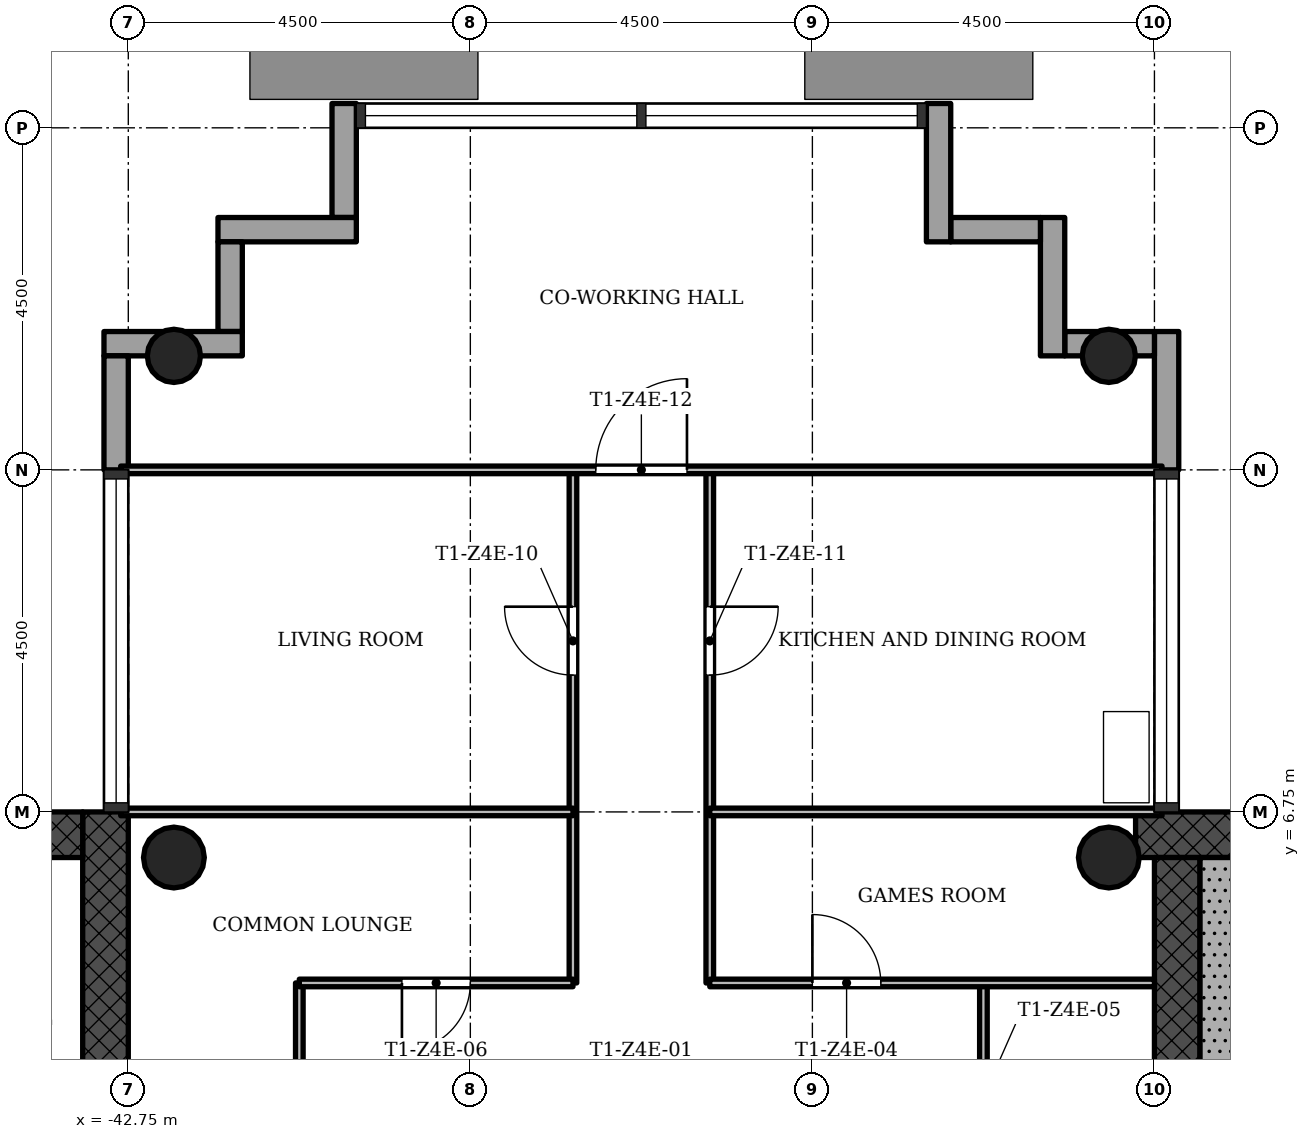
"""IFC4 building model, lengths in metres.
Left out: names, types, materials, properties, quantities, classifications, styles, units other than length and angle.
Written with IfcOpenShell. Run it as: python <this file> out.ifc"""

import sys

from ifc_helpers import new_model, si_unit, direction, frame, frame_2d, origin, origin_2d, place, context, subcontext, project, spatial, rectangle, hollow_circle, extrude, element, fill, save


model = new_model("IFC4")
c1 = context("Model", 3, precision=1e-05, world=origin(), true_north=direction((0.0, 1.0)))
c2 = subcontext(c1, "Body", "Model", "MODEL_VIEW")
j1 = project(units=[si_unit("LENGTHUNIT", "METRE"), si_unit("PLANEANGLEUNIT", "RADIAN")], contexts=[c1])
p1 = place(None, origin())
s1 = spatial("IfcSite", under=j1, at=p1, CompositionType="ELEMENT")
p2 = place(p1, origin())
s2 = spatial("IfcBuilding", under=s1, at=p2, CompositionType="ELEMENT")
p3 = place(p2, frame((0.0, 0.0, 209.6)))
s3 = spatial("IfcBuildingStorey", under=s2, at=p3, CompositionType="ELEMENT", Elevation=209.6)
p4 = place(p3, frame((-20.602, 6.45, 0.0), z_axis=(0.0, 0.0, 1.0), x_axis=(-1.0, 0.0, 0.0)))
e1 = element("IfcWall", 1, at=p4, inside=s3, PredefinedType="SHEAR", context=c2, shape_type="SweptSolid", body=[
    extrude(rectangle(XDim=8.896, YDim=0.6, at=frame_2d((4.448, 0.0))), origin(), (0.0, 0.0, 1.0), 3.4),
])
p5 = place(p3, frame((-28.95, 6.15, 0.0), z_axis=(0.0, 0.0, 1.0), x_axis=(0.0, -1.0, 0.0)))
e2 = element("IfcWall", 2, at=p5, inside=s3, PredefinedType="SHEAR", context=c2, shape_type="SweptSolid", body=[
    extrude(rectangle(XDim=12.9, YDim=0.6, at=frame_2d((6.45, 0.0))), origin(), (0.0, 0.0, 1.0), 3.4),
])
p6 = place(p5, frame((5.25, 0.0, 0.0)))
e3 = element("IfcOpeningElement", 3, at=p6, cuts=e2, PredefinedType="OPENING", context=c2, shape_type="SweptSolid", body=[
    extrude(rectangle(XDim=1.8, YDim=2.1, at=frame_2d((0.9, 1.05))), frame((0.0, 0.31, 0.0), z_axis=(0.0, -1.0, 0.0), x_axis=(1.0, 0.0, 0.0)), (0.0, 0.0, 1.0), 0.62),
])
p7 = place(p3, frame((-43.05, -6.15, 0.0), z_axis=(0.0, 0.0, 1.0), x_axis=(0.0, 1.0, 0.0)))
e4 = element("IfcWall", 4, at=p7, inside=s3, PredefinedType="SHEAR", context=c2, shape_type="SweptSolid", body=[
    extrude(rectangle(XDim=12.9, YDim=0.6, at=frame_2d((6.45, 0.0))), origin(), (0.0, 0.0, 1.0), 3.4),
])
p8 = place(p7, frame((5.25, 0.0, 0.0)))
e5 = element("IfcOpeningElement", 5, at=p8, cuts=e4, PredefinedType="OPENING", context=c2, shape_type="SweptSolid", body=[
    extrude(rectangle(XDim=1.8, YDim=2.1, at=frame_2d((0.9, 1.05))), frame((0.0, 0.31, 0.0), z_axis=(0.0, -1.0, 0.0), x_axis=(1.0, 0.0, 0.0)), (0.0, 0.0, 1.0), 0.62),
])
p9 = place(p3, frame((-43.35, 6.45, 0.0), z_axis=(0.0, 0.0, 1.0), x_axis=(-1.0, 0.0, 0.0)))
e6 = element("IfcWall", 6, at=p9, inside=s3, PredefinedType="SHEAR", context=c2, shape_type="SweptSolid", body=[
    extrude(rectangle(XDim=8.4, YDim=0.6, at=frame_2d((4.2, 0.0))), origin(), (0.0, 0.0, 1.0), 3.4),
])
for number, where, z_axis, x_axis in (
    (7, (-29.85, 12.75, 0.0), (0.0, 0.0, 1.0), (1.0, 0.0, 0.0)),
    (8, (-42.15, 12.75, 0.0), (0.0, 0.0, 1.0), (1.0, 0.0, 0.0)),
):
    element("IfcColumn", number, at=place(p3, frame(where, z_axis=z_axis, x_axis=x_axis)), inside=s3, PredefinedType="COLUMN", context=c2, shape_type="SweptSolid", body=[
        extrude(hollow_circle(Radius=0.35, WallThickness=0.025, at=origin_2d()), origin(), (0.0, 0.0, 1.0), 3.4),
    ])
for number, where, z_axis, x_axis in (
    (9, (-29.85, 6.15, 0.0), (0.0, 0.0, 1.0), (1.0, 0.0, 0.0)),
    (10, (-42.15, 6.15, 0.0), (0.0, 0.0, 1.0), (1.0, 0.0, 0.0)),
):
    element("IfcColumn", number, at=place(p3, frame(where, z_axis=z_axis, x_axis=x_axis)), inside=s3, PredefinedType="COLUMN", context=c2, shape_type="SweptSolid", body=[
        extrude(hollow_circle(Radius=0.4, WallThickness=0.028, at=origin_2d()), origin(), (0.0, 0.0, 1.0), 3.4),
    ])
p10 = place(p3, frame((-29.09, 11.25, -0.3), z_axis=(0.0, 0.0, 1.0), x_axis=(0.0, 1.0, 0.0)))
e11 = element("IfcWall", 11, at=p10, inside=s3, PredefinedType="STANDARD", context=c2, shape_type="SweptSolid", body=[
    extrude(rectangle(XDim=1.82, YDim=0.32, at=frame_2d((0.91, 0.0))), origin(), (0.0, 0.0, 1.0), 3.4),
])
p11 = place(p3, frame((-29.25, 12.91, -0.3), z_axis=(0.0, 0.0, 1.0), x_axis=(-1.0, 0.0, 0.0)))
e12 = element("IfcWall", 12, at=p11, inside=s3, PredefinedType="STANDARD", context=c2, shape_type="SweptSolid", body=[
    extrude(rectangle(XDim=1.18, YDim=0.32, at=frame_2d((0.59, 0.0))), origin(), (0.0, 0.0, 1.0), 3.4),
])
p12 = place(p3, frame((-30.59, 12.75, -0.3), z_axis=(0.0, 0.0, 1.0), x_axis=(0.0, 1.0, 0.0)))
e13 = element("IfcWall", 13, at=p12, inside=s3, PredefinedType="STANDARD", context=c2, shape_type="SweptSolid", body=[
    extrude(rectangle(XDim=1.82, YDim=0.32, at=frame_2d((0.91, 0.0))), origin(), (0.0, 0.0, 1.0), 3.4),
])
p13 = place(p3, frame((-30.75, 14.41, -0.3), z_axis=(0.0, 0.0, 1.0), x_axis=(-1.0, 0.0, 0.0)))
e14 = element("IfcWall", 14, at=p13, inside=s3, PredefinedType="STANDARD", context=c2, shape_type="SweptSolid", body=[
    extrude(rectangle(XDim=1.18, YDim=0.32, at=frame_2d((0.59, 0.0))), origin(), (0.0, 0.0, 1.0), 3.4),
])
p14 = place(p3, frame((-32.09, 14.25, -0.3), z_axis=(0.0, 0.0, 1.0), x_axis=(0.0, 1.0, 0.0)))
e15 = element("IfcWall", 15, at=p14, inside=s3, PredefinedType="STANDARD", context=c2, shape_type="SweptSolid", body=[
    extrude(rectangle(XDim=1.82, YDim=0.32, at=frame_2d((0.91, 0.0))), origin(), (0.0, 0.0, 1.0), 3.4),
])
p15 = place(p3, frame((-39.91, 16.07, -0.3), z_axis=(0.0, 0.0, 1.0), x_axis=(0.0, -1.0, 0.0)))
e16 = element("IfcWall", 16, at=p15, inside=s3, PredefinedType="STANDARD", context=c2, shape_type="SweptSolid", body=[
    extrude(rectangle(XDim=1.5, YDim=0.32, at=frame_2d((0.75, 0.0))), origin(), (0.0, 0.0, 1.0), 3.4),
])
p16 = place(p3, frame((-39.75, 14.41, -0.3), z_axis=(0.0, 0.0, 1.0), x_axis=(-1.0, 0.0, 0.0)))
e17 = element("IfcWall", 17, at=p16, inside=s3, PredefinedType="STANDARD", context=c2, shape_type="SweptSolid", body=[
    extrude(rectangle(XDim=1.82, YDim=0.32, at=frame_2d((0.91, 0.0))), origin(), (0.0, 0.0, 1.0), 3.4),
])
p17 = place(p3, frame((-41.41, 14.25, -0.3), z_axis=(0.0, 0.0, 1.0), x_axis=(0.0, -1.0, 0.0)))
e18 = element("IfcWall", 18, at=p17, inside=s3, PredefinedType="STANDARD", context=c2, shape_type="SweptSolid", body=[
    extrude(rectangle(XDim=1.18, YDim=0.32, at=frame_2d((0.59, 0.0))), origin(), (0.0, 0.0, 1.0), 3.4),
])
p18 = place(p3, frame((-41.25, 12.91, -0.3), z_axis=(0.0, 0.0, 1.0), x_axis=(-1.0, 0.0, 0.0)))
e19 = element("IfcWall", 19, at=p18, inside=s3, PredefinedType="STANDARD", context=c2, shape_type="SweptSolid", body=[
    extrude(rectangle(XDim=1.82, YDim=0.32, at=frame_2d((0.91, 0.0))), origin(), (0.0, 0.0, 1.0), 3.4),
])
p19 = place(p3, frame((-42.91, 12.75, -0.3), z_axis=(0.0, 0.0, 1.0), x_axis=(0.0, -1.0, 0.0)))
e20 = element("IfcWall", 20, at=p19, inside=s3, PredefinedType="STANDARD", context=c2, shape_type="SweptSolid", body=[
    extrude(rectangle(XDim=1.5, YDim=0.32, at=frame_2d((0.75, 0.0))), origin(), (0.0, 0.0, 1.0), 3.4),
])
p20 = place(p3, frame((-40.5, 1.5, 0.0), z_axis=(0.0, 0.0, 1.0), x_axis=(0.0, 1.0, 0.0)))
e21 = element("IfcWall", 21, at=p20, inside=s3, PredefinedType="PARTITIONING", context=c2, shape_type="SweptSolid", body=[
    extrude(rectangle(XDim=3.0, YDim=0.1, at=frame_2d((1.5, 0.0))), origin(), (0.0, 0.0, 1.0), 3.0),
])
p21 = place(p3, frame((-36.9, 4.5, 0.0), z_axis=(0.0, 0.0, 1.0), x_axis=(0.0, 1.0, 0.0)))
e22 = element("IfcWall", 22, at=p21, inside=s3, PredefinedType="PARTITIONING", context=c2, shape_type="SweptSolid", body=[
    extrude(rectangle(XDim=6.75, YDim=0.1, at=frame_2d((3.375, 0.0))), origin(), (0.0, 0.0, 1.0), 3.0),
])
p22 = place(p21, frame((4.05, 0.0, 0.0)))
e23 = element("IfcOpeningElement", 23, at=p22, cuts=e22, PredefinedType="OPENING", context=c2, shape_type="SweptSolid", body=[
    extrude(rectangle(XDim=0.9, YDim=2.1, at=frame_2d((0.45, 1.05))), frame((0.0, 0.06, 0.0), z_axis=(0.0, -1.0, 0.0), x_axis=(1.0, 0.0, 0.0)), (0.0, 0.0, 1.0), 0.12),
])
p23 = place(p3, frame((-35.1, 4.5, 0.0), z_axis=(0.0, 0.0, 1.0), x_axis=(0.0, 1.0, 0.0)))
e24 = element("IfcWall", 24, at=p23, inside=s3, PredefinedType="PARTITIONING", context=c2, shape_type="SweptSolid", body=[
    extrude(rectangle(XDim=6.75, YDim=0.1, at=frame_2d((3.375, 0.0))), origin(), (0.0, 0.0, 1.0), 3.0),
])
p24 = place(p23, frame((4.05, 0.0, 0.0)))
e25 = element("IfcOpeningElement", 25, at=p24, cuts=e24, PredefinedType="OPENING", context=c2, shape_type="SweptSolid", body=[
    extrude(rectangle(XDim=0.9, YDim=2.1, at=frame_2d((0.45, 1.05))), frame((0.0, 0.06, 0.0), z_axis=(0.0, -1.0, 0.0), x_axis=(1.0, 0.0, 0.0)), (0.0, 0.0, 1.0), 0.12),
])
p25 = place(p3, frame((-31.5, 1.5, 0.0), z_axis=(0.0, 0.0, 1.0), x_axis=(0.0, 1.0, 0.0)))
e26 = element("IfcWall", 26, at=p25, inside=s3, PredefinedType="PARTITIONING", context=c2, shape_type="SweptSolid", body=[
    extrude(rectangle(XDim=3.0, YDim=0.1, at=frame_2d((1.5, 0.0))), origin(), (0.0, 0.0, 1.0), 3.0),
])
p26 = place(p25, frame((1.05, 0.0, 0.0)))
e27 = element("IfcOpeningElement", 27, at=p26, cuts=e26, PredefinedType="OPENING", context=c2, shape_type="SweptSolid", body=[
    extrude(rectangle(XDim=0.9, YDim=2.1, at=frame_2d((0.45, 1.05))), frame((0.0, 0.06, 0.0), z_axis=(0.0, -1.0, 0.0), x_axis=(1.0, 0.0, 0.0)), (0.0, 0.0, 1.0), 0.12),
])
p27 = place(p3, frame((-40.5, 4.5, 0.0), z_axis=(0.0, 0.0, 1.0), x_axis=(1.0, 0.0, 0.0)))
e28 = element("IfcWall", 28, at=p27, inside=s3, PredefinedType="PARTITIONING", context=c2, shape_type="SweptSolid", body=[
    extrude(rectangle(XDim=3.6, YDim=0.1, at=frame_2d((1.8, 0.0))), origin(), (0.0, 0.0, 1.0), 3.0),
])
p28 = place(p27, frame((1.35, 0.0, 0.0)))
e29 = element("IfcOpeningElement", 29, at=p28, cuts=e28, PredefinedType="OPENING", context=c2, shape_type="SweptSolid", body=[
    extrude(rectangle(XDim=0.9, YDim=2.1, at=frame_2d((0.45, 1.05))), frame((0.0, 0.06, 0.0), z_axis=(0.0, -1.0, 0.0), x_axis=(1.0, 0.0, 0.0)), (0.0, 0.0, 1.0), 0.12),
])
p29 = place(p3, frame((-35.1, 4.5, 0.0), z_axis=(0.0, 0.0, 1.0), x_axis=(1.0, 0.0, 0.0)))
e30 = element("IfcWall", 30, at=p29, inside=s3, PredefinedType="PARTITIONING", context=c2, shape_type="SweptSolid", body=[
    extrude(rectangle(XDim=5.85, YDim=0.1, at=frame_2d((2.925, 0.0))), origin(), (0.0, 0.0, 1.0), 3.0),
])
p30 = place(p29, frame((1.35, 0.0, 0.0)))
e31 = element("IfcOpeningElement", 31, at=p30, cuts=e30, PredefinedType="OPENING", context=c2, shape_type="SweptSolid", body=[
    extrude(rectangle(XDim=0.9, YDim=2.1, at=frame_2d((0.45, 1.05))), frame((0.0, 0.06, 0.0), z_axis=(0.0, -1.0, 0.0), x_axis=(1.0, 0.0, 0.0)), (0.0, 0.0, 1.0), 0.12),
])
for number, where, z_axis, x_axis in (
    (32, (-42.85, 6.75, 0.0), (0.0, 0.0, 1.0), (1.0, 0.0, 0.0)),
    (33, (-35.1, 6.75, 0.0), (0.0, 0.0, 1.0), (1.0, 0.0, 0.0)),
):
    element("IfcWall", number, at=place(p3, frame(where, z_axis=z_axis, x_axis=x_axis)), inside=s3, PredefinedType="PARTITIONING", context=c2, shape_type="SweptSolid", body=[
        extrude(rectangle(XDim=5.95, YDim=0.1, at=frame_2d((2.975, 0.0))), origin(), (0.0, 0.0, 1.0), 3.0),
    ])
p31 = place(p3, frame((-42.85, 11.25, 0.0), z_axis=(0.0, 0.0, 1.0), x_axis=(1.0, 0.0, 0.0)))
e34 = element("IfcWall", 34, at=p31, inside=s3, PredefinedType="PARTITIONING", context=c2, shape_type="SweptSolid", body=[
    extrude(rectangle(XDim=13.7, YDim=0.1, at=frame_2d((6.85, 0.0))), origin(), (0.0, 0.0, 1.0), 3.0),
])
p32 = place(p31, frame((6.25, 0.0, 0.0)))
e35 = element("IfcOpeningElement", 35, at=p32, cuts=e34, PredefinedType="OPENING", context=c2, shape_type="SweptSolid", body=[
    extrude(rectangle(XDim=1.2, YDim=2.1, at=frame_2d((0.6, 1.05))), frame((0.0, 0.06, 0.0), z_axis=(0.0, -1.0, 0.0), x_axis=(1.0, 0.0, 0.0)), (0.0, 0.0, 1.0), 0.12),
])
p33 = place(p3, frame((-28.35, 1.85, 0.0), z_axis=(0.0, 0.0, 1.0), x_axis=(0.0, 1.0, 0.0)))
e36 = element("IfcWall", 36, at=p33, inside=s3, PredefinedType="SHEAR", context=c2, shape_type="SweptSolid", body=[
    extrude(rectangle(XDim=4.3, YDim=0.6, at=frame_2d((2.15, 0.0))), origin(), (0.0, 0.0, 1.0), 3.4),
])
p34 = place(p30, origin())
e37 = element("IfcDoor", 37, at=p34, inside=s3, OperationType="SINGLE_SWING_RIGHT", PredefinedType="DOOR", context=c2, shape_type="SweptSolid", body=[
    extrude(rectangle(XDim=0.9, YDim=2.1, at=frame_2d((0.45, 1.05))), frame((0.0, 0.025, 0.0), z_axis=(0.0, -1.0, 0.0), x_axis=(1.0, 0.0, 0.0)), (0.0, 0.0, 1.0), 0.05),
])
fill(e31, e37)
p35 = place(p28, origin())
e38 = element("IfcDoor", 38, at=p35, inside=s3, OperationType="SINGLE_SWING_LEFT", PredefinedType="DOOR", context=c2, shape_type="SweptSolid", body=[
    extrude(rectangle(XDim=0.9, YDim=2.1, at=frame_2d((0.45, 1.05))), frame((0.0, 0.025, 0.0), z_axis=(0.0, -1.0, 0.0), x_axis=(1.0, 0.0, 0.0)), (0.0, 0.0, 1.0), 0.05),
])
fill(e29, e38)
p36 = place(p22, origin())
e39 = element("IfcDoor", 39, at=p36, inside=s3, OperationType="SINGLE_SWING_LEFT", PredefinedType="DOOR", context=c2, shape_type="SweptSolid", body=[
    extrude(rectangle(XDim=0.9, YDim=2.1, at=frame_2d((0.45, 1.05))), frame((0.0, 0.025, 0.0), z_axis=(0.0, -1.0, 0.0), x_axis=(1.0, 0.0, 0.0)), (0.0, 0.0, 1.0), 0.05),
])
fill(e23, e39)
p37 = place(p24, origin())
e40 = element("IfcDoor", 40, at=p37, inside=s3, OperationType="SINGLE_SWING_RIGHT", PredefinedType="DOOR", context=c2, shape_type="SweptSolid", body=[
    extrude(rectangle(XDim=0.9, YDim=2.1, at=frame_2d((0.45, 1.05))), frame((0.0, 0.025, 0.0), z_axis=(0.0, -1.0, 0.0), x_axis=(1.0, 0.0, 0.0)), (0.0, 0.0, 1.0), 0.05),
])
fill(e25, e40)
p38 = place(p32, origin())
e41 = element("IfcDoor", 41, at=p38, inside=s3, OperationType="SINGLE_SWING_LEFT", PredefinedType="DOOR", context=c2, shape_type="SweptSolid", body=[
    extrude(rectangle(XDim=1.2, YDim=2.1, at=frame_2d((0.6, 1.05))), frame((0.0, 0.025, 0.0), z_axis=(0.0, -1.0, 0.0), x_axis=(1.0, 0.0, 0.0)), (0.0, 0.0, 1.0), 0.05),
])
fill(e35, e41)
save(model, sys.argv[1])
